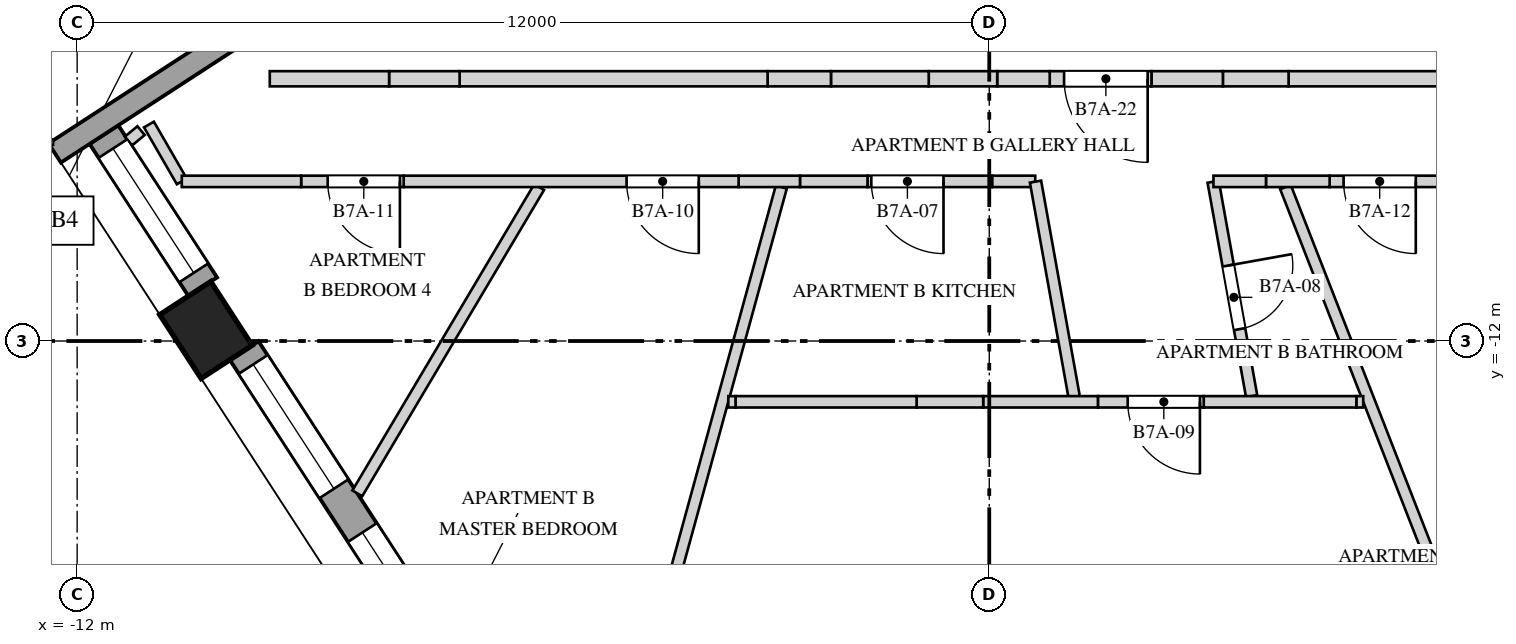
"""IFC4 building model, lengths in metres.
Left out: names, types, materials, properties, quantities, classifications, styles, units other than length and angle.
Written with IfcOpenShell. Run it as: python <this file> out.ifc"""

import sys

from ifc_helpers import new_model, si_unit, direction, frame, frame_2d, origin, origin_2d, place, context, subcontext, project, spatial, polyline, rectangle, outline, extrude, element, fill, save


model = new_model("IFC4")
c1 = context("Model", 3, precision=1e-05, world=origin(), true_north=direction((0.0, 1.0)))
c2 = subcontext(c1, "Body", "Model", "MODEL_VIEW")
j1 = project(units=[si_unit("LENGTHUNIT", "METRE"), si_unit("PLANEANGLEUNIT", "RADIAN")], contexts=[c1])
p1 = place(None, origin())
s1 = spatial("IfcSite", under=j1, at=p1, CompositionType="ELEMENT")
p2 = place(p1, origin())
s2 = spatial("IfcBuilding", under=s1, at=p2, CompositionType="ELEMENT")
p3 = place(p2, frame((0.0, 0.0, 274.4)))
s3 = spatial("IfcBuildingStorey", under=s2, at=p3, CompositionType="ELEMENT", Elevation=274.4)
p4 = place(p3, frame((-10.306, -11.856, -0.35), z_axis=(0.0, 0.0, 1.0), x_axis=(0.544639035015, -0.838670567945, 0.0)))
e1 = element("IfcColumn", 1, at=p4, inside=s3, PredefinedType="COLUMN", context=c2, shape_type="SweptSolid", body=[
    extrude(rectangle(XDim=1.0, YDim=0.8, at=origin_2d()), origin(), (0.0, 0.0, 1.0), 4.35),
])
p5 = place(p3, frame((-11.647, -9.285, 0.0), z_axis=(0.0, 0.0, 1.0), x_axis=(0.544722247615, -0.838616523182, 0.0)))
e2 = element("IfcWall", 2, at=p5, inside=s3, PredefinedType="SOLIDWALL", context=c2, shape_type="SweptSolid", body=[
    extrude(rectangle(XDim=2.387, YDim=0.45, at=frame_2d((1.193, 0.0))), origin(), (0.0, 0.0, 1.0), 3.3),
])
p6 = place(p5, frame((0.218, 0.0, 0.4)))
e3 = element("IfcOpeningElement", 3, at=p6, cuts=e2, PredefinedType="OPENING", context=c2, shape_type="SweptSolid", body=[
    extrude(rectangle(XDim=1.95, YDim=2.75, at=frame_2d((0.975, 1.375))), frame((0.0, 0.235, 0.0), z_axis=(0.0, -1.0, 0.0), x_axis=(1.0, 0.0, 0.0)), (0.0, 0.0, 1.0), 0.47),
])
p7 = place(p3, frame((-9.803, -12.125, 0.0), z_axis=(0.0, 0.0, 1.0), x_axis=(0.544649987904, -0.838663454954, 0.0)))
e4 = element("IfcWall", 4, at=p7, inside=s3, PredefinedType="SOLIDWALL", context=c2, shape_type="SweptSolid", body=[
    extrude(rectangle(XDim=7.66, YDim=0.45, at=frame_2d((3.83, 0.0))), origin(), (0.0, 0.0, 1.0), 3.3),
])
p8 = place(p7, frame((0.218, 0.0, 0.4)))
e5 = element("IfcOpeningElement", 5, at=p8, cuts=e4, PredefinedType="OPENING", context=c2, shape_type="SweptSolid", body=[
    extrude(rectangle(XDim=1.95, YDim=2.75, at=frame_2d((0.975, 1.375))), frame((0.0, 0.235, 0.0), z_axis=(0.0, -1.0, 0.0), x_axis=(1.0, 0.0, 0.0)), (0.0, 0.0, 1.0), 0.47),
])
p9 = place(p7, frame((2.855, 0.0, 0.4)))
e6 = element("IfcOpeningElement", 6, at=p9, cuts=e4, PredefinedType="OPENING", context=c2, shape_type="SweptSolid", body=[
    extrude(rectangle(XDim=1.95, YDim=2.75, at=frame_2d((0.975, 1.375))), frame((0.0, 0.235, 0.0), z_axis=(0.0, -1.0, 0.0), x_axis=(1.0, 0.0, 0.0)), (0.0, 0.0, 1.0), 0.47),
])
p10 = place(p7, frame((5.492, 0.0, 0.4)))
e7 = element("IfcOpeningElement", 7, at=p10, cuts=e4, PredefinedType="OPENING", context=c2, shape_type="SweptSolid", body=[
    extrude(rectangle(XDim=1.95, YDim=2.1, at=frame_2d((0.975, 1.05))), frame((0.0, 0.235, 0.0), z_axis=(0.0, -1.0, 0.0), x_axis=(1.0, 0.0, 0.0)), (0.0, 0.0, 1.0), 0.47),
])
p11 = place(p3, frame((-12.295, -9.527, 0.0), z_axis=(0.0, 0.0, 1.0), x_axis=(0.838664840319, 0.544647854685, 0.0)))
e8 = element("IfcWall", 8, at=p11, inside=s3, PredefinedType="SOLIDWALL", context=c2, shape_type="SweptSolid", body=[
    extrude(rectangle(XDim=3.05, YDim=0.3, at=frame_2d((1.525, 0.0))), origin(), (0.0, 0.0, 1.0), 3.3),
])
p12 = place(p3, frame((-11.159, -9.232, 0.0), z_axis=(0.0, 0.0, 1.0), x_axis=(-0.770548519297, -0.637381345357, 0.0)))
e9 = element("IfcWall", 9, at=p12, inside=s3, PredefinedType="PARTITIONING", context=c2, shape_type="SweptSolid", body=[
    extrude(rectangle(XDim=0.215, YDim=0.15, at=frame_2d((0.107, 0.0))), origin(), (0.0, 0.0, 1.0), 3.65),
])
p13 = place(p3, frame((-10.623, -9.9, 0.0), z_axis=(0.0, 0.0, 1.0), x_axis=(-0.499999740363, 0.866025553686, 0.0)))
e10 = element("IfcWall", 10, at=p13, inside=s3, PredefinedType="PARTITIONING", context=c2, shape_type="SweptSolid", body=[
    extrude(rectangle(XDim=0.864, YDim=0.15, at=frame_2d((0.432, 0.0))), origin(), (0.0, 0.0, 1.0), 3.65),
])
p14 = place(p3, frame((-8.314, -14.004, 0.0), z_axis=(0.0, 0.0, 1.0), x_axis=(0.510490601778, 0.859883332491, 0.0)))
e11 = element("IfcWall", 11, at=p14, inside=s3, PredefinedType="PARTITIONING", context=c2, shape_type="SweptSolid", body=[
    extrude(rectangle(XDim=4.686, YDim=0.15, at=frame_2d((2.343, 0.0))), origin(), (0.0, 0.0, 1.0), 3.65),
])
p15 = place(p3, frame((-5.169, -18.846, 0.0), z_axis=(0.0, 0.0, 1.0), x_axis=(0.264522923164, 0.964379397914, 0.0)))
e12 = element("IfcWall", 12, at=p15, inside=s3, PredefinedType="PARTITIONING", context=c2, shape_type="SweptSolid", body=[
    extrude(rectangle(XDim=9.199, YDim=0.15, at=frame_2d((4.6, 0.0))), origin(), (0.0, 0.0, 1.0), 2.75),
])
p16 = place(p3, frame((0.605, -9.9, 0.0), z_axis=(0.0, 0.0, 1.0), x_axis=(-1.0, 0.0, 0.0)))
e13 = element("IfcWall", 13, at=p16, inside=s3, PredefinedType="PARTITIONING", context=c2, shape_type="SweptSolid", body=[
    extrude(rectangle(XDim=0.568, YDim=0.15, at=frame_2d((0.284, 0.0))), origin(), (0.0, 0.0, 1.0), 3.65),
])
p17 = place(p3, frame((0.037, -9.9, 0.0), z_axis=(0.0, 0.0, 1.0), x_axis=(-1.0, 0.0, 0.0)))
e14 = element("IfcWall", 14, at=p17, inside=s3, PredefinedType="PARTITIONING", context=c2, shape_type="SweptSolid", body=[
    extrude(outline(polyline([(0.0, 0.0), (1.639, 0.0), (1.639, 3.65), (0.876, 3.65), (0.876, 2.55), (0.0, 2.55), (0.0, 0.0)])), frame((0.0, 0.075, 0.0), z_axis=(0.0, -1.0, 0.0), x_axis=(1.0, 0.0, 0.0)), (0.0, 0.0, 1.0), 0.15),
])
p18 = place(p17, frame((0.639, 0.0, 0.0)))
e15 = element("IfcOpeningElement", 15, at=p18, cuts=e14, PredefinedType="OPENING", context=c2, shape_type="SweptSolid", body=[
    extrude(rectangle(XDim=0.95, YDim=2.4, at=frame_2d((0.475, 1.2))), frame((0.0, 0.085, 0.0), z_axis=(0.0, -1.0, 0.0), x_axis=(1.0, 0.0, 0.0)), (0.0, 0.0, 1.0), 0.17),
])
p19 = place(p3, frame((-1.602, -9.9, 0.0), z_axis=(0.0, 0.0, 1.0), x_axis=(-1.0, 0.0, 0.0)))
e16 = element("IfcWall", 16, at=p19, inside=s3, PredefinedType="PARTITIONING", context=c2, shape_type="SweptSolid", body=[
    extrude(rectangle(XDim=0.888, YDim=0.15, at=frame_2d((0.444, 0.0))), origin(), (0.0, 0.0, 1.0), 3.65),
])
p20 = place(p3, frame((-2.49, -9.9, 0.0), z_axis=(0.0, 0.0, 1.0), x_axis=(-1.0, 0.0, 0.0)))
e17 = element("IfcWall", 17, at=p20, inside=s3, PredefinedType="PARTITIONING", context=c2, shape_type="SweptSolid", body=[
    extrude(rectangle(XDim=0.807, YDim=0.15, at=frame_2d((0.404, 0.0))), origin(), (0.0, 0.0, 1.0), 2.75),
])
p21 = place(p3, frame((-3.298, -9.9, 0.0), z_axis=(0.0, 0.0, 1.0), x_axis=(-1.0, 0.0, 0.0)))
e18 = element("IfcWall", 18, at=p21, inside=s3, PredefinedType="PARTITIONING", context=c2, shape_type="SweptSolid", body=[
    extrude(rectangle(XDim=4.406, YDim=0.15, at=frame_2d((2.203, 0.0))), origin(), (0.0, 0.0, 1.0), 3.65),
])
p22 = place(p21, frame((0.524, 0.0, 0.0)))
e19 = element("IfcOpeningElement", 19, at=p22, cuts=e18, PredefinedType="OPENING", context=c2, shape_type="SweptSolid", body=[
    extrude(rectangle(XDim=0.95, YDim=2.4, at=frame_2d((0.475, 1.2))), frame((0.0, 0.085, 0.0), z_axis=(0.0, -1.0, 0.0), x_axis=(1.0, 0.0, 0.0)), (0.0, 0.0, 1.0), 0.17),
])
p23 = place(p3, frame((-7.704, -9.9, 0.0), z_axis=(0.0, 0.0, 1.0), x_axis=(-1.0, 0.0, 0.0)))
e20 = element("IfcWall", 20, at=p23, inside=s3, PredefinedType="PARTITIONING", context=c2, shape_type="SweptSolid", body=[
    extrude(outline(polyline([(0.0, 0.0), (1.349, 0.0), (1.349, 2.95), (0.455, 2.95), (0.455, 3.65), (0.0, 3.65), (0.0, 0.0)])), frame((0.0, 0.075, 0.0), z_axis=(0.0, -1.0, 0.0), x_axis=(1.0, 0.0, 0.0)), (0.0, 0.0, 1.0), 0.15),
])
p24 = place(p23, frame((0.05, 0.0, 0.0)))
e21 = element("IfcOpeningElement", 21, at=p24, cuts=e20, PredefinedType="OPENING", context=c2, shape_type="SweptSolid", body=[
    extrude(rectangle(XDim=0.95, YDim=2.4, at=frame_2d((0.475, 1.2))), frame((0.0, 0.085, 0.0), z_axis=(0.0, -1.0, 0.0), x_axis=(1.0, 0.0, 0.0)), (0.0, 0.0, 1.0), 0.17),
])
p25 = place(p3, frame((-9.053, -9.9, 0.0), z_axis=(0.0, 0.0, 1.0), x_axis=(-1.0, 0.0, 0.0)))
e22 = element("IfcWall", 22, at=p25, inside=s3, PredefinedType="PARTITIONING", context=c2, shape_type="SweptSolid", body=[
    extrude(rectangle(XDim=1.57, YDim=0.15, at=frame_2d((0.785, 0.0))), origin(), (0.0, 0.0, 1.0), 3.65),
])
p26 = place(p3, frame((1.128, -12.797, 0.0), z_axis=(0.0, 0.0, 1.0), x_axis=(-0.176626932502, 0.984277870682, 0.0)))
e23 = element("IfcWall", 23, at=p26, inside=s3, PredefinedType="PARTITIONING", context=c2, shape_type="SweptSolid", body=[
    extrude(rectangle(XDim=2.94, YDim=0.15, at=frame_2d((1.47, 0.0))), origin(), (0.0, 0.0, 1.0), 3.65),
])
p27 = place(p3, frame((2.946, -9.905, 0.0), z_axis=(0.0, 0.0, 1.0), x_axis=(0.17664289563, -0.984275005993, 0.0)))
e24 = element("IfcWall", 24, at=p27, inside=s3, PredefinedType="PARTITIONING", context=c2, shape_type="SweptSolid", body=[
    extrude(rectangle(XDim=2.865, YDim=0.15, at=frame_2d((1.433, 0.0))), origin(), (0.0, 0.0, 1.0), 3.65),
])
p28 = place(p27, frame((1.12, 0.0, 0.0)))
e25 = element("IfcOpeningElement", 25, at=p28, cuts=e24, PredefinedType="OPENING", context=c2, shape_type="SweptSolid", body=[
    extrude(rectangle(XDim=0.85, YDim=2.4, at=frame_2d((0.425, 1.2))), frame((0.0, 0.085, 0.0), z_axis=(0.0, -1.0, 0.0), x_axis=(1.0, 0.0, 0.0)), (0.0, 0.0, 1.0), 0.17),
])
p29 = place(p3, frame((3.897, -9.975, 0.0), z_axis=(0.0, 0.0, 1.0), x_axis=(0.363873008582, -0.931448567354, 0.0)))
e26 = element("IfcWall", 26, at=p29, inside=s3, PredefinedType="PARTITIONING", context=c2, shape_type="SweptSolid", body=[
    extrude(rectangle(XDim=8.833, YDim=0.15, at=frame_2d((4.417, 0.0))), origin(), (0.0, 0.0, 1.0), 2.75),
])
p30 = place(p3, frame((4.92, -12.8, 0.0), z_axis=(0.0, 0.0, 1.0), x_axis=(-1.0, 0.0, 0.0)))
e27 = element("IfcWall", 27, at=p30, inside=s3, PredefinedType="PARTITIONING", context=c2, shape_type="SweptSolid", body=[
    extrude(rectangle(XDim=0.09, YDim=0.15, at=frame_2d((0.045, 0.0))), origin(), (0.0, 0.0, 1.0), 2.75),
])
p31 = place(p3, frame((4.83, -12.8, 0.0), z_axis=(0.0, 0.0, 1.0), x_axis=(-1.0, 0.0, 0.0)))
e28 = element("IfcWall", 28, at=p31, inside=s3, PredefinedType="PARTITIONING", context=c2, shape_type="SweptSolid", body=[
    extrude(rectangle(XDim=2.008, YDim=0.15, at=frame_2d((1.004, 0.0))), origin(), (0.0, 0.0, 1.0), 3.65),
])
p32 = place(p3, frame((2.822, -12.8, 0.0), z_axis=(0.0, 0.0, 1.0), x_axis=(-1.0, 0.0, 0.0)))
e29 = element("IfcWall", 29, at=p32, inside=s3, PredefinedType="PARTITIONING", context=c2, shape_type="SweptSolid", body=[
    extrude(outline(polyline([(0.0, 0.0), (1.392, 0.0), (1.392, 2.55), (0.508, 2.55), (0.508, 3.65), (0.0, 3.65), (0.0, 0.0)])), frame((0.0, 0.075, 0.0), z_axis=(0.0, -1.0, 0.0), x_axis=(1.0, 0.0, 0.0)), (0.0, 0.0, 1.0), 0.15),
])
p33 = place(p32, frame((0.05, 0.0, 0.0)))
e30 = element("IfcOpeningElement", 30, at=p33, cuts=e29, PredefinedType="OPENING", context=c2, shape_type="SweptSolid", body=[
    extrude(rectangle(XDim=0.95, YDim=2.4, at=frame_2d((0.475, 1.2))), frame((0.0, 0.085, 0.0), z_axis=(0.0, -1.0, 0.0), x_axis=(1.0, 0.0, 0.0)), (0.0, 0.0, 1.0), 0.17),
])
p34 = place(p3, frame((1.429, -12.8, 0.0), z_axis=(0.0, 0.0, 1.0), x_axis=(-1.0, 0.0, 0.0)))
e31 = element("IfcWall", 31, at=p34, inside=s3, PredefinedType="PARTITIONING", context=c2, shape_type="SweptSolid", body=[
    extrude(rectangle(XDim=1.51, YDim=0.15, at=frame_2d((0.755, 0.0))), origin(), (0.0, 0.0, 1.0), 3.65),
])
p35 = place(p3, frame((-0.08, -12.8, 0.0), z_axis=(0.0, 0.0, 1.0), x_axis=(-1.0, 0.0, 0.0)))
e32 = element("IfcWall", 32, at=p35, inside=s3, PredefinedType="PARTITIONING", context=c2, shape_type="SweptSolid", body=[
    extrude(rectangle(XDim=0.876, YDim=0.15, at=frame_2d((0.438, 0.0))), origin(), (0.0, 0.0, 1.0), 2.55),
])
p36 = place(p3, frame((-0.956, -12.8, 0.0), z_axis=(0.0, 0.0, 1.0), x_axis=(-1.0, 0.0, 0.0)))
e33 = element("IfcWall", 33, at=p36, inside=s3, PredefinedType="PARTITIONING", context=c2, shape_type="SweptSolid", body=[
    extrude(rectangle(XDim=2.382, YDim=0.15, at=frame_2d((1.191, 0.0))), origin(), (0.0, 0.0, 1.0), 3.65),
])
p37 = place(p3, frame((-3.338, -12.8, 0.0), z_axis=(0.0, 0.0, 1.0), x_axis=(-1.0, 0.0, 0.0)))
e34 = element("IfcWall", 34, at=p37, inside=s3, PredefinedType="PARTITIONING", context=c2, shape_type="SweptSolid", body=[
    extrude(rectangle(XDim=0.095, YDim=0.15, at=frame_2d((0.047, 0.0))), origin(), (0.0, 0.0, 1.0), 2.75),
])
p38 = place(p3, frame((10.121, -9.9, 0.0), z_axis=(0.0, 0.0, 1.0), x_axis=(-1.0, 0.0, 0.0)))
e35 = element("IfcWall", 35, at=p38, inside=s3, PredefinedType="PARTITIONING", context=c2, shape_type="SweptSolid", body=[
    extrude(rectangle(XDim=5.643, YDim=0.15, at=frame_2d((2.822, 0.0))), origin(), (0.0, 0.0, 1.0), 3.65),
])
p39 = place(p38, frame((4.51, 0.0, 0.0)))
e36 = element("IfcOpeningElement", 36, at=p39, cuts=e35, PredefinedType="OPENING", context=c2, shape_type="SweptSolid", body=[
    extrude(rectangle(XDim=0.95, YDim=2.4, at=frame_2d((0.475, 1.2))), frame((0.0, 0.085, 0.0), z_axis=(0.0, -1.0, 0.0), x_axis=(1.0, 0.0, 0.0)), (0.0, 0.0, 1.0), 0.17),
])
p40 = place(p3, frame((4.478, -9.9, 0.0), z_axis=(0.0, 0.0, 1.0), x_axis=(-1.0, 0.0, 0.0)))
e37 = element("IfcWall", 37, at=p40, inside=s3, PredefinedType="PARTITIONING", context=c2, shape_type="SweptSolid", body=[
    extrude(rectangle(XDim=0.838, YDim=0.15, at=frame_2d((0.419, 0.0))), origin(), (0.0, 0.0, 1.0), 2.75),
])
p41 = place(p3, frame((3.64, -9.9, 0.0), z_axis=(0.0, 0.0, 1.0), x_axis=(-1.0, 0.0, 0.0)))
e38 = element("IfcWall", 38, at=p41, inside=s3, PredefinedType="PARTITIONING", context=c2, shape_type="SweptSolid", body=[
    extrude(rectangle(XDim=0.691, YDim=0.15, at=frame_2d((0.345, 0.0))), origin(), (0.0, 0.0, 1.0), 3.65),
])
p42 = place(p3, frame((8.655, -8.55, 0.0), z_axis=(0.0, 0.0, 1.0), x_axis=(-1.0, 0.0, 0.0)))
e39 = element("IfcWall", 39, at=p42, inside=s3, PredefinedType="SOLIDWALL", context=c2, shape_type="SweptSolid", body=[
    extrude(rectangle(XDim=4.717, YDim=0.2, at=frame_2d((2.359, 0.0))), origin(), (0.0, 0.0, 1.0), 3.65),
])
p43 = place(p3, frame((3.938, -8.55, 0.0), z_axis=(0.0, 0.0, 1.0), x_axis=(-1.0, 0.0, 0.0)))
e40 = element("IfcWall", 40, at=p43, inside=s3, PredefinedType="SOLIDWALL", context=c2, shape_type="SweptSolid", body=[
    extrude(rectangle(XDim=0.865, YDim=0.2, at=frame_2d((0.432, 0.0))), origin(), (0.0, 0.0, 1.0), 2.75),
])
p44 = place(p3, frame((3.073, -8.55, 0.0), z_axis=(0.0, 0.0, 1.0), x_axis=(-1.0, 0.0, 0.0)))
e41 = element("IfcWall", 41, at=p44, inside=s3, PredefinedType="SOLIDWALL", context=c2, shape_type="SweptSolid", body=[
    extrude(rectangle(XDim=0.939, YDim=0.2, at=frame_2d((0.47, 0.0))), origin(), (0.0, 0.0, 1.0), 3.65),
])
p45 = place(p3, frame((2.134, -8.55, 0.0), z_axis=(0.0, 0.0, 1.0), x_axis=(-1.0, 0.0, 0.0)))
e42 = element("IfcWall", 42, at=p45, inside=s3, PredefinedType="SOLIDWALL", context=c2, shape_type="SweptSolid", body=[
    extrude(outline(polyline([(0.0, 0.0), (1.339, 0.0), (1.339, 2.55), (0.429, 2.55), (0.429, 3.65), (0.0, 3.65), (0.0, 0.0)])), frame((0.0, 0.1, 0.0), z_axis=(0.0, -1.0, 0.0), x_axis=(1.0, 0.0, 0.0)), (0.0, 0.0, 1.0), 0.2),
])
p46 = place(p45, frame((0.05, 0.0, 0.0)))
e43 = element("IfcOpeningElement", 43, at=p46, cuts=e42, PredefinedType="OPENING", context=c2, shape_type="SweptSolid", body=[
    extrude(rectangle(XDim=1.1, YDim=2.4, at=frame_2d((0.55, 1.2))), frame((0.0, 0.11, 0.0), z_axis=(0.0, -1.0, 0.0), x_axis=(1.0, 0.0, 0.0)), (0.0, 0.0, 1.0), 0.22),
])
p47 = place(p3, frame((0.795, -8.55, 0.0), z_axis=(0.0, 0.0, 1.0), x_axis=(-1.0, 0.0, 0.0)))
e44 = element("IfcWall", 44, at=p47, inside=s3, PredefinedType="SOLIDWALL", context=c2, shape_type="SweptSolid", body=[
    extrude(rectangle(XDim=0.691, YDim=0.2, at=frame_2d((0.345, 0.0))), origin(), (0.0, 0.0, 1.0), 3.65),
])
p48 = place(p3, frame((0.104, -8.55, 0.0), z_axis=(0.0, 0.0, 1.0), x_axis=(-1.0, 0.0, 0.0)))
e45 = element("IfcWall", 45, at=p48, inside=s3, PredefinedType="SOLIDWALL", context=c2, shape_type="SweptSolid", body=[
    extrude(rectangle(XDim=0.901, YDim=0.2, at=frame_2d((0.45, 0.0))), origin(), (0.0, 0.0, 1.0), 2.55),
])
p49 = place(p3, frame((-0.796, -8.55, 0.0), z_axis=(0.0, 0.0, 1.0), x_axis=(-1.0, 0.0, 0.0)))
e46 = element("IfcWall", 46, at=p49, inside=s3, PredefinedType="SOLIDWALL", context=c2, shape_type="SweptSolid", body=[
    extrude(rectangle(XDim=1.286, YDim=0.2, at=frame_2d((0.643, 0.0))), origin(), (0.0, 0.0, 1.0), 3.65),
])
p50 = place(p3, frame((-2.083, -8.55, 0.0), z_axis=(0.0, 0.0, 1.0), x_axis=(-1.0, 0.0, 0.0)))
e47 = element("IfcWall", 47, at=p50, inside=s3, PredefinedType="SOLIDWALL", context=c2, shape_type="SweptSolid", body=[
    extrude(rectangle(XDim=0.833, YDim=0.2, at=frame_2d((0.417, 0.0))), origin(), (0.0, 0.0, 1.0), 2.75),
])
p51 = place(p3, frame((-2.916, -8.55, 0.0), z_axis=(0.0, 0.0, 1.0), x_axis=(-1.0, 0.0, 0.0)))
e48 = element("IfcWall", 48, at=p51, inside=s3, PredefinedType="SOLIDWALL", context=c2, shape_type="SweptSolid", body=[
    extrude(rectangle(XDim=4.052, YDim=0.2, at=frame_2d((2.026, 0.0))), origin(), (0.0, 0.0, 1.0), 3.65),
])
p52 = place(p3, frame((-6.969, -8.55, 0.0), z_axis=(0.0, 0.0, 1.0), x_axis=(-1.0, 0.0, 0.0)))
e49 = element("IfcWall", 49, at=p52, inside=s3, PredefinedType="SOLIDWALL", context=c2, shape_type="SweptSolid", body=[
    extrude(rectangle(XDim=0.927, YDim=0.2, at=frame_2d((0.464, 0.0))), origin(), (0.0, 0.0, 1.0), 2.95),
])
p53 = place(p3, frame((-7.896, -8.55, 0.0), z_axis=(0.0, 0.0, 1.0), x_axis=(-1.0, 0.0, 0.0)))
e50 = element("IfcWall", 50, at=p53, inside=s3, PredefinedType="SOLIDWALL", context=c2, shape_type="SweptSolid", body=[
    extrude(rectangle(XDim=1.57, YDim=0.2, at=frame_2d((0.785, 0.0))), origin(), (0.0, 0.0, 1.0), 3.65),
])
p54 = place(p6, origin())
e51 = element("IfcWindow", 51, at=p54, inside=s3, PartitioningType="SINGLE_PANEL", PredefinedType="WINDOW", context=c2, shape_type="SweptSolid", body=[
    extrude(rectangle(XDim=1.95, YDim=2.75, at=frame_2d((0.975, 1.375))), frame((0.0, 0.03, 0.0), z_axis=(0.0, -1.0, 0.0), x_axis=(1.0, 0.0, 0.0)), (0.0, 0.0, 1.0), 0.06),
])
fill(e3, e51)
p55 = place(p8, origin())
e52 = element("IfcWindow", 52, at=p55, inside=s3, PartitioningType="SINGLE_PANEL", PredefinedType="WINDOW", context=c2, shape_type="SweptSolid", body=[
    extrude(rectangle(XDim=1.95, YDim=2.75, at=frame_2d((0.975, 1.375))), frame((0.0, 0.03, 0.0), z_axis=(0.0, -1.0, 0.0), x_axis=(1.0, 0.0, 0.0)), (0.0, 0.0, 1.0), 0.06),
])
fill(e5, e52)
p56 = place(p9, origin())
e53 = element("IfcWindow", 53, at=p56, inside=s3, PartitioningType="SINGLE_PANEL", PredefinedType="WINDOW", context=c2, shape_type="SweptSolid", body=[
    extrude(rectangle(XDim=1.95, YDim=2.75, at=frame_2d((0.975, 1.375))), frame((0.0, 0.03, 0.0), z_axis=(0.0, -1.0, 0.0), x_axis=(1.0, 0.0, 0.0)), (0.0, 0.0, 1.0), 0.06),
])
fill(e6, e53)
p57 = place(p18, origin())
e54 = element("IfcDoor", 54, at=p57, inside=s3, OperationType="SINGLE_SWING_LEFT", PredefinedType="DOOR", context=c2, shape_type="SweptSolid", body=[
    extrude(rectangle(XDim=0.95, YDim=2.4, at=frame_2d((0.475, 1.2))), frame((0.0, 0.025, 0.0), z_axis=(0.0, -1.0, 0.0), x_axis=(1.0, 0.0, 0.0)), (0.0, 0.0, 1.0), 0.05),
])
fill(e15, e54)
p58 = place(p28, origin())
e55 = element("IfcDoor", 55, at=p58, inside=s3, OperationType="SINGLE_SWING_RIGHT", PredefinedType="DOOR", context=c2, shape_type="SweptSolid", body=[
    extrude(rectangle(XDim=0.85, YDim=2.4, at=frame_2d((0.425, 1.2))), frame((0.0, 0.025, 0.0), z_axis=(0.0, -1.0, 0.0), x_axis=(1.0, 0.0, 0.0)), (0.0, 0.0, 1.0), 0.05),
])
fill(e25, e55)
p59 = place(p33, origin())
e56 = element("IfcDoor", 56, at=p59, inside=s3, OperationType="SINGLE_SWING_LEFT", PredefinedType="DOOR", context=c2, shape_type="SweptSolid", body=[
    extrude(rectangle(XDim=0.95, YDim=2.4, at=frame_2d((0.475, 1.2))), frame((0.0, 0.025, 0.0), z_axis=(0.0, -1.0, 0.0), x_axis=(1.0, 0.0, 0.0)), (0.0, 0.0, 1.0), 0.05),
])
fill(e30, e56)
p60 = place(p22, origin())
e57 = element("IfcDoor", 57, at=p60, inside=s3, OperationType="SINGLE_SWING_RIGHT", PredefinedType="DOOR", context=c2, shape_type="SweptSolid", body=[
    extrude(rectangle(XDim=0.95, YDim=2.4, at=frame_2d((0.475, 1.2))), frame((0.0, 0.025, 0.0), z_axis=(0.0, -1.0, 0.0), x_axis=(1.0, 0.0, 0.0)), (0.0, 0.0, 1.0), 0.05),
])
fill(e19, e57)
p61 = place(p24, origin())
e58 = element("IfcDoor", 58, at=p61, inside=s3, OperationType="SINGLE_SWING_LEFT", PredefinedType="DOOR", context=c2, shape_type="SweptSolid", body=[
    extrude(rectangle(XDim=0.95, YDim=2.4, at=frame_2d((0.475, 1.2))), frame((0.0, 0.025, 0.0), z_axis=(0.0, -1.0, 0.0), x_axis=(1.0, 0.0, 0.0)), (0.0, 0.0, 1.0), 0.05),
])
fill(e21, e58)
p62 = place(p39, origin())
e59 = element("IfcDoor", 59, at=p62, inside=s3, OperationType="SINGLE_SWING_RIGHT", PredefinedType="DOOR", context=c2, shape_type="SweptSolid", body=[
    extrude(rectangle(XDim=0.95, YDim=2.4, at=frame_2d((0.475, 1.2))), frame((0.0, 0.025, 0.0), z_axis=(0.0, -1.0, 0.0), x_axis=(1.0, 0.0, 0.0)), (0.0, 0.0, 1.0), 0.05),
])
fill(e36, e59)
p63 = place(p46, origin())
e60 = element("IfcDoor", 60, at=p63, inside=s3, OperationType="SINGLE_SWING_RIGHT", PredefinedType="DOOR", context=c2, shape_type="SweptSolid", body=[
    extrude(rectangle(XDim=1.1, YDim=2.4, at=frame_2d((0.55, 1.2))), frame((0.0, 0.025, 0.0), z_axis=(0.0, -1.0, 0.0), x_axis=(1.0, 0.0, 0.0)), (0.0, 0.0, 1.0), 0.05),
])
fill(e43, e60)
save(model, sys.argv[1])
